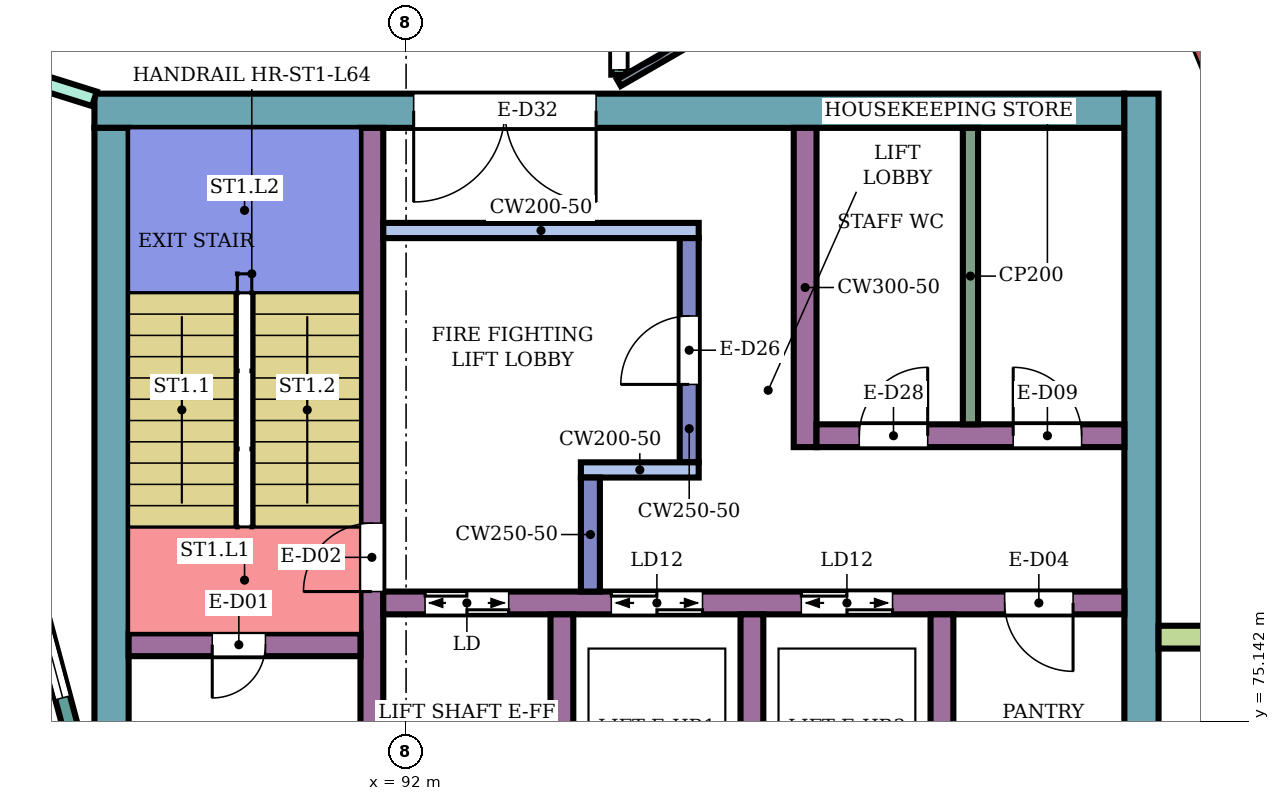
"""IFC4 building model, lengths in metres.
Left out: names, types, materials, properties, quantities, classifications, styles, units other than length and angle.
Written with IfcOpenShell. Run it as: python <this file> out.ifc"""

import sys

from ifc_helpers import new_model, si_unit, direction, frame, frame_2d, origin, place, context, subcontext, project, spatial, rectangle, extrude, element, fill, save


model = new_model("IFC4")
c1 = context("Model", 3, precision=1e-05, world=origin(), true_north=direction((0.0, 1.0)))
c2 = subcontext(c1, "Body", "Model", "MODEL_VIEW")
j1 = project(units=[si_unit("LENGTHUNIT", "METRE"), si_unit("PLANEANGLEUNIT", "RADIAN")], contexts=[c1])
p1 = place(None, origin())
s1 = spatial("IfcSite", under=j1, at=p1, CompositionType="ELEMENT")
p2 = place(p1, origin())
s2 = spatial("IfcBuilding", under=s1, at=p2, CompositionType="ELEMENT")
p3 = place(p2, frame((0.0, 0.0, 279.9)))
s3 = spatial("IfcBuildingStorey", under=s2, at=p3, CompositionType="ELEMENT", Elevation=279.9)
p4 = place(p3, frame((87.9, 83.175, 0.0), z_axis=(0.0, 0.0, 1.0), x_axis=(1.0, 0.0, 0.0)))
e1 = element("IfcWall", 1, at=p4, inside=s3, PredefinedType="SHEAR", context=c2, shape_type="SweptSolid", body=[
    extrude(rectangle(XDim=13.55, YDim=0.45, at=frame_2d((6.775, 0.0))), origin(), (0.0, 0.0, 1.0), 3.88),
])
p5 = place(p4, frame((4.2, 0.0, 0.0)))
e2 = element("IfcOpeningElement", 2, at=p5, cuts=e1, PredefinedType="OPENING", context=c2, shape_type="SweptSolid", body=[
    extrude(rectangle(XDim=2.4, YDim=2.4, at=frame_2d((1.2, 1.2))), frame((0.0, 0.235, 0.0), z_axis=(0.0, -1.0, 0.0), x_axis=(1.0, 0.0, 0.0)), (0.0, 0.0, 1.0), 0.47),
])
p6 = place(p3, frame((88.125, 75.0, 0.0), z_axis=(0.0, 0.0, 1.0), x_axis=(0.0, 1.0, 0.0)))
e3 = element("IfcWall", 3, at=p6, inside=s3, PredefinedType="SHEAR", context=c2, shape_type="SweptSolid", body=[
    extrude(rectangle(XDim=7.95, YDim=0.45, at=frame_2d((3.975, 0.0))), origin(), (0.0, 0.0, 1.0), 3.88),
])
p7 = place(p3, frame((101.675, 66.6, 0.0), z_axis=(0.0, 0.0, 1.0), x_axis=(0.0, 1.0, 0.0)))
e4 = element("IfcWall", 4, at=p7, inside=s3, PredefinedType="SHEAR", context=c2, shape_type="SweptSolid", body=[
    extrude(rectangle(XDim=16.8, YDim=0.45, at=frame_2d((8.4, 0.0))), origin(), (0.0, 0.0, 1.0), 3.88),
])
p8 = place(p3, frame((91.55, 75.0, 0.0), z_axis=(0.0, 0.0, 1.0), x_axis=(0.0, 1.0, 0.0)))
e5 = element("IfcWall", 5, at=p8, inside=s3, PredefinedType="SHEAR", context=c2, shape_type="SweptSolid", body=[
    extrude(rectangle(XDim=7.95, YDim=0.3, at=frame_2d((3.975, 0.0))), origin(), (0.0, 0.0, 1.0), 3.88),
])
p9 = place(p8, frame((1.85, 0.0, 0.0)))
e6 = element("IfcOpeningElement", 6, at=p9, cuts=e5, PredefinedType="OPENING", context=c2, shape_type="SweptSolid", body=[
    extrude(rectangle(XDim=0.9, YDim=2.1, at=frame_2d((0.45, 1.05))), frame((0.0, 0.16, 0.0), z_axis=(0.0, -1.0, 0.0), x_axis=(1.0, 0.0, 0.0)), (0.0, 0.0, 1.0), 0.32),
])
p10 = place(p3, frame((88.35, 76.15, 0.0), z_axis=(0.0, 0.0, 1.0), x_axis=(1.0, 0.0, 0.0)))
e7 = element("IfcWall", 7, at=p10, inside=s3, PredefinedType="SHEAR", context=c2, shape_type="SweptSolid", body=[
    extrude(rectangle(XDim=3.05, YDim=0.3, at=frame_2d((1.525, 0.0))), origin(), (0.0, 0.0, 1.0), 3.88),
])
p11 = place(p10, frame((1.1, 0.0, 0.0)))
e8 = element("IfcOpeningElement", 8, at=p11, cuts=e7, PredefinedType="OPENING", context=c2, shape_type="SweptSolid", body=[
    extrude(rectangle(XDim=0.7, YDim=2.0, at=frame_2d((0.35, 1.0))), frame((0.0, 0.16, 0.0), z_axis=(0.0, -1.0, 0.0), x_axis=(1.0, 0.0, 0.0)), (0.0, 0.0, 1.0), 0.32),
])
p12 = place(p3, frame((91.7, 76.7, 0.0), z_axis=(0.0, 0.0, 1.0), x_axis=(1.0, 0.0, 0.0)))
e9 = element("IfcWall", 9, at=p12, inside=s3, PredefinedType="SHEAR", context=c2, shape_type="SweptSolid", body=[
    extrude(rectangle(XDim=9.75, YDim=0.3, at=frame_2d((4.875, 0.0))), origin(), (0.0, 0.0, 1.0), 3.88),
])
p13 = place(p12, frame((0.55, 0.0, 0.0)))
e10 = element("IfcOpeningElement", 10, at=p13, cuts=e9, PredefinedType="OPENING", context=c2, shape_type="SweptSolid", body=[
    extrude(rectangle(XDim=1.1, YDim=2.1, at=frame_2d((0.55, 1.05))), frame((0.0, 0.16, 0.0), z_axis=(0.0, -1.0, 0.0), x_axis=(1.0, 0.0, 0.0)), (0.0, 0.0, 1.0), 0.32),
])
p14 = place(p12, frame((3.0, 0.0, 0.0)))
e11 = element("IfcOpeningElement", 11, at=p14, cuts=e9, PredefinedType="OPENING", context=c2, shape_type="SweptSolid", body=[
    extrude(rectangle(XDim=1.2, YDim=2.1, at=frame_2d((0.6, 1.05))), frame((0.0, 0.16, 0.0), z_axis=(0.0, -1.0, 0.0), x_axis=(1.0, 0.0, 0.0)), (0.0, 0.0, 1.0), 0.32),
])
p15 = place(p12, frame((5.5, 0.0, 0.0)))
e12 = element("IfcOpeningElement", 12, at=p15, cuts=e9, PredefinedType="OPENING", context=c2, shape_type="SweptSolid", body=[
    extrude(rectangle(XDim=1.2, YDim=2.1, at=frame_2d((0.6, 1.05))), frame((0.0, 0.16, 0.0), z_axis=(0.0, -1.0, 0.0), x_axis=(1.0, 0.0, 0.0)), (0.0, 0.0, 1.0), 0.32),
])
p16 = place(p12, frame((8.175, 0.0, 0.0)))
e13 = element("IfcOpeningElement", 13, at=p16, cuts=e9, PredefinedType="OPENING", context=c2, shape_type="SweptSolid", body=[
    extrude(rectangle(XDim=0.9, YDim=2.1, at=frame_2d((0.45, 1.05))), frame((0.0, 0.16, 0.0), z_axis=(0.0, -1.0, 0.0), x_axis=(1.0, 0.0, 0.0)), (0.0, 0.0, 1.0), 0.32),
])
for number, where, z_axis, x_axis in (
    (14, (94.05, 74.0, 0.0), (0.0, 0.0, 1.0), (0.0, 1.0, 0.0)),
    (15, (96.55, 74.0, 0.0), (0.0, 0.0, 1.0), (0.0, 1.0, 0.0)),
    (16, (99.05, 74.0, 0.0), (0.0, 0.0, 1.0), (0.0, 1.0, 0.0)),
):
    element("IfcWall", number, at=place(p3, frame(where, z_axis=z_axis, x_axis=x_axis)), inside=s3, PredefinedType="SHEAR", context=c2, shape_type="SweptSolid", body=[
        extrude(rectangle(XDim=2.55, YDim=0.3, at=frame_2d((1.275, 0.0))), origin(), (0.0, 0.0, 1.0), 3.88),
    ])
p17 = place(p3, frame((91.7, 81.6, 0.0), z_axis=(0.0, 0.0, 1.0), x_axis=(1.0, 0.0, 0.0)))
e17 = element("IfcWall", 17, at=p17, inside=s3, PredefinedType="SHEAR", context=c2, shape_type="SweptSolid", body=[
    extrude(rectangle(XDim=4.15, YDim=0.2, at=frame_2d((2.075, 0.0))), origin(), (0.0, 0.0, 1.0), 3.88),
])
p18 = place(p3, frame((95.725, 78.55, 0.0), z_axis=(0.0, 0.0, 1.0), x_axis=(0.0, 1.0, 0.0)))
e18 = element("IfcWall", 18, at=p18, inside=s3, PredefinedType="SHEAR", context=c2, shape_type="SweptSolid", body=[
    extrude(rectangle(XDim=2.95, YDim=0.25, at=frame_2d((1.475, 0.0))), origin(), (0.0, 0.0, 1.0), 3.88),
])
p19 = place(p18, frame((1.025, 0.0, 0.0)))
e19 = element("IfcOpeningElement", 19, at=p19, cuts=e18, PredefinedType="OPENING", context=c2, shape_type="SweptSolid", body=[
    extrude(rectangle(XDim=0.9, YDim=2.1, at=frame_2d((0.45, 1.05))), frame((0.0, 0.135, 0.0), z_axis=(0.0, -1.0, 0.0), x_axis=(1.0, 0.0, 0.0)), (0.0, 0.0, 1.0), 0.27),
])
p20 = place(p3, frame((94.3, 78.45, 0.0), z_axis=(0.0, 0.0, 1.0), x_axis=(1.0, 0.0, 0.0)))
e20 = element("IfcWall", 20, at=p20, inside=s3, PredefinedType="SHEAR", context=c2, shape_type="SweptSolid", body=[
    extrude(rectangle(XDim=1.55, YDim=0.2, at=frame_2d((0.775, 0.0))), origin(), (0.0, 0.0, 1.0), 3.88),
])
p21 = place(p3, frame((94.425, 76.85, 0.0), z_axis=(0.0, 0.0, 1.0), x_axis=(0.0, 1.0, 0.0)))
e21 = element("IfcWall", 21, at=p21, inside=s3, PredefinedType="SHEAR", context=c2, shape_type="SweptSolid", body=[
    extrude(rectangle(XDim=1.5, YDim=0.25, at=frame_2d((0.75, 0.0))), origin(), (0.0, 0.0, 1.0), 3.88),
])
p22 = place(p3, frame((97.25, 78.75, 0.0), z_axis=(0.0, 0.0, 1.0), x_axis=(0.0, 1.0, 0.0)))
e22 = element("IfcWall", 22, at=p22, inside=s3, PredefinedType="SHEAR", context=c2, shape_type="SweptSolid", body=[
    extrude(rectangle(XDim=4.2, YDim=0.3, at=frame_2d((2.1, 0.0))), origin(), (0.0, 0.0, 1.0), 3.88),
])
p23 = place(p3, frame((97.4, 78.9, 0.0), z_axis=(0.0, 0.0, 1.0), x_axis=(1.0, 0.0, 0.0)))
e23 = element("IfcWall", 23, at=p23, inside=s3, PredefinedType="SHEAR", context=c2, shape_type="SweptSolid", body=[
    extrude(rectangle(XDim=4.05, YDim=0.3, at=frame_2d((2.025, 0.0))), origin(), (0.0, 0.0, 1.0), 3.88),
])
p24 = place(p23, frame((0.562, 0.0, 0.0)))
e24 = element("IfcOpeningElement", 24, at=p24, cuts=e23, PredefinedType="OPENING", context=c2, shape_type="SweptSolid", body=[
    extrude(rectangle(XDim=0.9, YDim=2.1, at=frame_2d((0.45, 1.05))), frame((0.0, 0.16, 0.0), z_axis=(0.0, -1.0, 0.0), x_axis=(1.0, 0.0, 0.0)), (0.0, 0.0, 1.0), 0.32),
])
p25 = place(p23, frame((2.587, 0.0, 0.0)))
e25 = element("IfcOpeningElement", 25, at=p25, cuts=e23, PredefinedType="OPENING", context=c2, shape_type="SweptSolid", body=[
    extrude(rectangle(XDim=0.9, YDim=2.1, at=frame_2d((0.45, 1.05))), frame((0.0, 0.16, 0.0), z_axis=(0.0, -1.0, 0.0), x_axis=(1.0, 0.0, 0.0)), (0.0, 0.0, 1.0), 0.32),
])
p26 = place(p3, frame((101.9, 76.25, 0.0), z_axis=(0.0, 0.0, 1.0), x_axis=(1.0, 0.0, 0.0)))
e26 = element("IfcWall", 26, at=p26, inside=s3, PredefinedType="NOTDEFINED", context=c2, shape_type="SweptSolid", body=[
    extrude(rectangle(XDim=2.416, YDim=0.3, at=frame_2d((1.208, 0.0))), origin(), (0.0, 0.0, 1.0), 4.2),
])
p27 = place(p3, frame((87.604, 75.0, 0.0), z_axis=(0.0, 0.0, 1.0), x_axis=(-0.258789828301, 0.965933654434, 0.0)))
e27 = element("IfcWall", 27, at=p27, inside=s3, PredefinedType="NOTDEFINED", context=c2, shape_type="SweptSolid", body=[
    extrude(rectangle(XDim=3.936, YDim=0.2, at=frame_2d((1.968, 0.0))), origin(), (0.0, 0.0, 1.0), 4.2),
])
p28 = place(p27, frame((0.468, 0.0, 0.9)))
e28 = element("IfcOpeningElement", 28, at=p28, cuts=e27, PredefinedType="OPENING", context=c2, shape_type="SweptSolid", body=[
    extrude(rectangle(XDim=3.0, YDim=2.3, at=frame_2d((1.5, 1.15))), frame((0.0, 0.11, 0.0), z_axis=(0.0, -1.0, 0.0), x_axis=(1.0, 0.0, 0.0)), (0.0, 0.0, 1.0), 0.22),
])
p29 = place(p3, frame((85.587, 84.057, 0.0), z_axis=(0.0, 0.0, 1.0), x_axis=(0.954239513179, -0.299043393987, 0.0)))
e29 = element("IfcWall", 29, at=p29, inside=s3, PredefinedType="PARTITIONING", context=c2, shape_type="SweptSolid", body=[
    extrude(rectangle(XDim=2.424, YDim=0.2, at=frame_2d((1.212, 0.0))), origin(), (0.0, 0.0, 1.0), 3.75),
])
p30 = place(p29, frame((0.762, 0.0, 0.0)))
e30 = element("IfcOpeningElement", 30, at=p30, cuts=e29, PredefinedType="OPENING", context=c2, shape_type="SweptSolid", body=[
    extrude(rectangle(XDim=0.9, YDim=2.1, at=frame_2d((0.45, 1.05))), frame((0.0, 0.11, 0.0), z_axis=(0.0, -1.0, 0.0), x_axis=(1.0, 0.0, 0.0)), (0.0, 0.0, 1.0), 0.22),
])
p31 = place(p3, frame((94.8, 83.65, 0.0), z_axis=(0.0, 0.0, 1.0), x_axis=(0.0, 1.0, 0.0)))
e31 = element("IfcWall", 31, at=p31, inside=s3, PredefinedType="PARTITIONING", context=c2, shape_type="SweptSolid", body=[
    extrude(rectangle(XDim=1.25, YDim=0.2, at=frame_2d((0.625, 0.0))), origin(), (0.0, 0.0, 1.0), 3.75),
])
p32 = place(p31, frame((0.062, 0.0, 0.0)))
e32 = element("IfcOpeningElement", 32, at=p32, cuts=e31, PredefinedType="OPENING", context=c2, shape_type="SweptSolid", body=[
    extrude(rectangle(XDim=1.0, YDim=2.1, at=frame_2d((0.5, 1.05))), frame((0.0, 0.11, 0.0), z_axis=(0.0, -1.0, 0.0), x_axis=(1.0, 0.0, 0.0)), (0.0, 0.0, 1.0), 0.22),
])
p33 = place(p3, frame((94.8, 83.545, 0.0), z_axis=(0.0, 0.0, 1.0), x_axis=(0.866044015472, 0.499967762227, 0.0)))
e33 = element("IfcWall", 33, at=p33, inside=s3, PredefinedType="PARTITIONING", context=c2, shape_type="SweptSolid", body=[
    extrude(rectangle(XDim=7.208, YDim=0.1, at=frame_2d((3.604, 0.0))), origin(), (0.0, 0.0, 1.0), 3.75),
])
p34 = place(p33, frame((3.129, 0.0, 0.0)))
e34 = element("IfcOpeningElement", 34, at=p34, cuts=e33, PredefinedType="OPENING", context=c2, shape_type="SweptSolid", body=[
    extrude(rectangle(XDim=0.9, YDim=2.1, at=frame_2d((0.45, 1.05))), frame((0.0, 0.06, 0.0), z_axis=(0.0, -1.0, 0.0), x_axis=(1.0, 0.0, 0.0)), (0.0, 0.0, 1.0), 0.12),
])
p35 = place(p3, frame((99.425, 79.05, 0.0), z_axis=(0.0, 0.0, 1.0), x_axis=(0.0, 1.0, 0.0)))
e35 = element("IfcWall", 35, at=p35, inside=s3, PredefinedType="PARTITIONING", context=c2, shape_type="SweptSolid", body=[
    extrude(rectangle(XDim=3.9, YDim=0.2, at=frame_2d((1.95, 0.0))), origin(), (0.0, 0.0, 1.0), 3.88),
])
p36 = place(p28, origin())
e36 = element("IfcWindow", 36, at=p36, inside=s3, PartitioningType="SINGLE_PANEL", PredefinedType="WINDOW", context=c2, shape_type="SweptSolid", body=[
    extrude(rectangle(XDim=3.0, YDim=2.3, at=frame_2d((1.5, 1.15))), frame((0.0, 0.03, 0.0), z_axis=(0.0, -1.0, 0.0), x_axis=(1.0, 0.0, 0.0)), (0.0, 0.0, 1.0), 0.06),
])
fill(e28, e36)
p37 = place(p32, frame((1.0, 0.0, 0.0), z_axis=(0.0, 0.0, 1.0), x_axis=(-1.0, 0.0, 0.0)))
e37 = element("IfcDoor", 37, at=p37, inside=s3, OperationType="SINGLE_SWING_LEFT", PredefinedType="DOOR", context=c2, shape_type="SweptSolid", body=[
    extrude(rectangle(XDim=1.0, YDim=2.1, at=frame_2d((0.5, 1.05))), frame((0.0, 0.025, 0.0), z_axis=(0.0, -1.0, 0.0), x_axis=(1.0, 0.0, 0.0)), (0.0, 0.0, 1.0), 0.05),
])
fill(e32, e37)
p38 = place(p11, frame((0.7, 0.0, 0.0), z_axis=(0.0, 0.0, 1.0), x_axis=(-1.0, 0.0, 0.0)))
e38 = element("IfcDoor", 38, at=p38, inside=s3, OperationType="SINGLE_SWING_RIGHT", PredefinedType="DOOR", context=c2, shape_type="SweptSolid", body=[
    extrude(rectangle(XDim=0.7, YDim=2.0, at=frame_2d((0.35, 1.0))), frame((0.0, 0.025, 0.0), z_axis=(0.0, -1.0, 0.0), x_axis=(1.0, 0.0, 0.0)), (0.0, 0.0, 1.0), 0.05),
])
fill(e8, e38)
p39 = place(p9, origin())
e39 = element("IfcDoor", 39, at=p39, inside=s3, OperationType="SINGLE_SWING_LEFT", PredefinedType="DOOR", context=c2, shape_type="SweptSolid", body=[
    extrude(rectangle(XDim=0.9, YDim=2.1, at=frame_2d((0.45, 1.05))), frame((0.0, 0.025, 0.0), z_axis=(0.0, -1.0, 0.0), x_axis=(1.0, 0.0, 0.0)), (0.0, 0.0, 1.0), 0.05),
])
fill(e6, e39)
p40 = place(p13, origin())
e40 = element("IfcDoor", 40, at=p40, inside=s3, OperationType="DOUBLE_DOOR_SLIDING", PredefinedType="DOOR", context=c2, shape_type="SweptSolid", body=[
    extrude(rectangle(XDim=1.1, YDim=2.1, at=frame_2d((0.55, 1.05))), frame((0.0, 0.025, 0.0), z_axis=(0.0, -1.0, 0.0), x_axis=(1.0, 0.0, 0.0)), (0.0, 0.0, 1.0), 0.05),
])
fill(e10, e40)
p41 = place(p14, origin())
e41 = element("IfcDoor", 41, at=p41, inside=s3, OperationType="DOUBLE_DOOR_SLIDING", PredefinedType="DOOR", context=c2, shape_type="SweptSolid", body=[
    extrude(rectangle(XDim=1.2, YDim=2.1, at=frame_2d((0.6, 1.05))), frame((0.0, 0.025, 0.0), z_axis=(0.0, -1.0, 0.0), x_axis=(1.0, 0.0, 0.0)), (0.0, 0.0, 1.0), 0.05),
])
fill(e11, e41)
p42 = place(p15, origin())
e42 = element("IfcDoor", 42, at=p42, inside=s3, OperationType="DOUBLE_DOOR_SLIDING", PredefinedType="DOOR", context=c2, shape_type="SweptSolid", body=[
    extrude(rectangle(XDim=1.2, YDim=2.1, at=frame_2d((0.6, 1.05))), frame((0.0, 0.025, 0.0), z_axis=(0.0, -1.0, 0.0), x_axis=(1.0, 0.0, 0.0)), (0.0, 0.0, 1.0), 0.05),
])
fill(e12, e42)
p43 = place(p16, frame((0.9, 0.0, 0.0), z_axis=(0.0, 0.0, 1.0), x_axis=(-1.0, 0.0, 0.0)))
e43 = element("IfcDoor", 43, at=p43, inside=s3, OperationType="SINGLE_SWING_LEFT", PredefinedType="DOOR", context=c2, shape_type="SweptSolid", body=[
    extrude(rectangle(XDim=0.9, YDim=2.1, at=frame_2d((0.45, 1.05))), frame((0.0, 0.025, 0.0), z_axis=(0.0, -1.0, 0.0), x_axis=(1.0, 0.0, 0.0)), (0.0, 0.0, 1.0), 0.05),
])
fill(e13, e43)
p44 = place(p19, origin())
e44 = element("IfcDoor", 44, at=p44, inside=s3, OperationType="SINGLE_SWING_LEFT", PredefinedType="DOOR", context=c2, shape_type="SweptSolid", body=[
    extrude(rectangle(XDim=0.9, YDim=2.1, at=frame_2d((0.45, 1.05))), frame((0.0, 0.025, 0.0), z_axis=(0.0, -1.0, 0.0), x_axis=(1.0, 0.0, 0.0)), (0.0, 0.0, 1.0), 0.05),
])
fill(e19, e44)
p45 = place(p24, origin())
e45 = element("IfcDoor", 45, at=p45, inside=s3, OperationType="SINGLE_SWING_RIGHT", PredefinedType="DOOR", context=c2, shape_type="SweptSolid", body=[
    extrude(rectangle(XDim=0.9, YDim=2.1, at=frame_2d((0.45, 1.05))), frame((0.0, 0.025, 0.0), z_axis=(0.0, -1.0, 0.0), x_axis=(1.0, 0.0, 0.0)), (0.0, 0.0, 1.0), 0.05),
])
fill(e24, e45)
p46 = place(p25, origin())
e46 = element("IfcDoor", 46, at=p46, inside=s3, OperationType="SINGLE_SWING_LEFT", PredefinedType="DOOR", context=c2, shape_type="SweptSolid", body=[
    extrude(rectangle(XDim=0.9, YDim=2.1, at=frame_2d((0.45, 1.05))), frame((0.0, 0.025, 0.0), z_axis=(0.0, -1.0, 0.0), x_axis=(1.0, 0.0, 0.0)), (0.0, 0.0, 1.0), 0.05),
])
fill(e25, e46)
p47 = place(p5, frame((2.4, 0.0, 0.0), z_axis=(0.0, 0.0, 1.0), x_axis=(-1.0, 0.0, 0.0)))
e47 = element("IfcDoor", 47, at=p47, inside=s3, OperationType="DOUBLE_DOOR_SINGLE_SWING", PredefinedType="DOOR", context=c2, shape_type="SweptSolid", body=[
    extrude(rectangle(XDim=2.4, YDim=2.4, at=frame_2d((1.2, 1.2))), frame((0.0, 0.025, 0.0), z_axis=(0.0, -1.0, 0.0), x_axis=(1.0, 0.0, 0.0)), (0.0, 0.0, 1.0), 0.05),
])
fill(e2, e47)
save(model, sys.argv[1])
